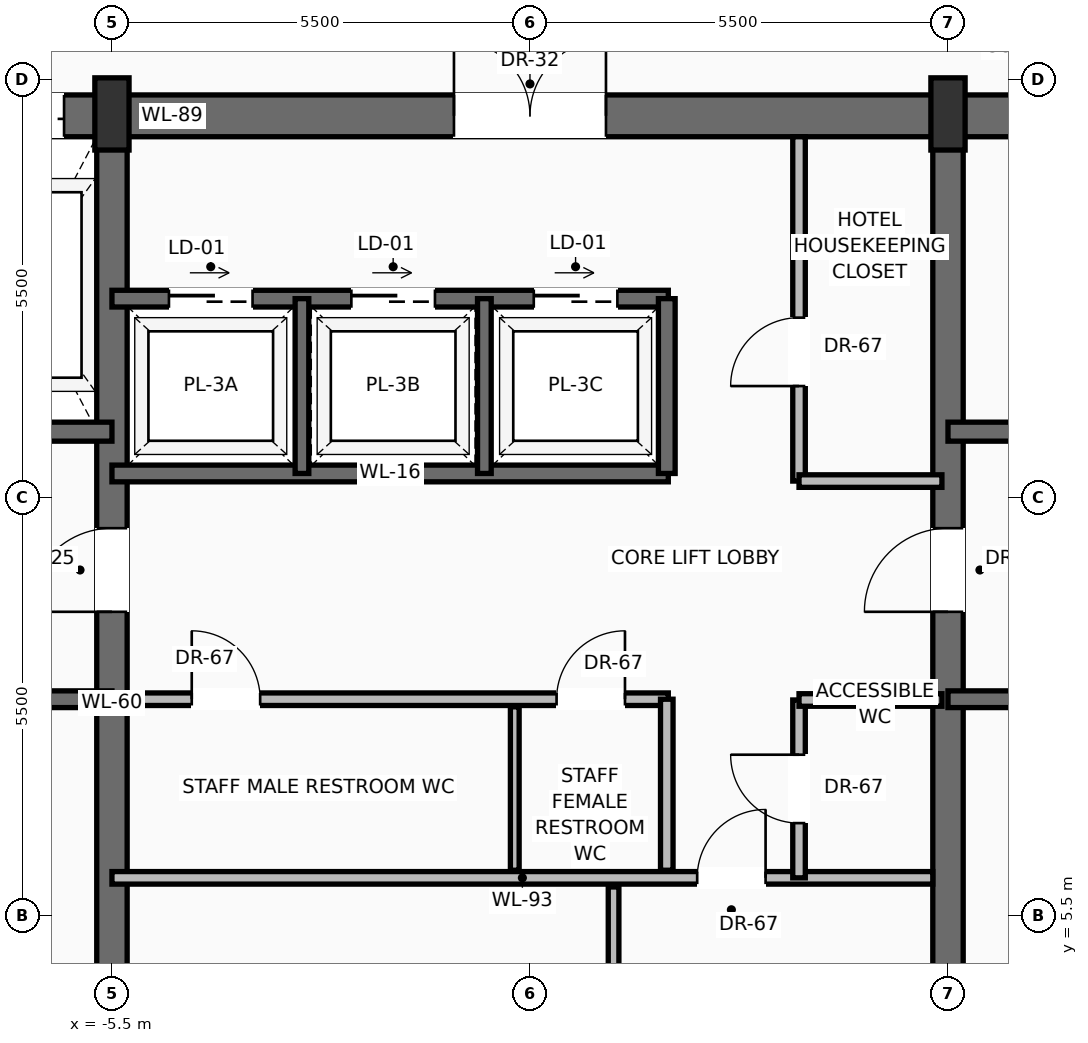
"""IFC4 building model, lengths in metres.
Left out: names, types, materials, properties, quantities, classifications, styles, units other than length and angle.
Written with IfcOpenShell. Run it as: python <this file> out.ifc"""

import sys

from ifc_helpers import new_model, si_unit, direction, frame, frame_2d, origin, origin_2d, place, context, subcontext, project, spatial, rectangle, extrude, source, transform, mapped, element, fill, save


model = new_model("IFC4")
c1 = context("Model", 3, precision=1e-05, world=origin(), true_north=direction((0.0, 1.0)))
c2 = subcontext(c1, "Body", "Model", "MODEL_VIEW")
j1 = project(units=[si_unit("LENGTHUNIT", "METRE"), si_unit("PLANEANGLEUNIT", "RADIAN")], contexts=[c1])
p1 = place(None, origin())
s1 = spatial("IfcSite", under=j1, at=p1, CompositionType="ELEMENT")
p2 = place(p1, origin())
s2 = spatial("IfcBuilding", under=s1, at=p2, CompositionType="ELEMENT")
p3 = place(p2, frame((0.0, 0.0, 237.25)))
s3 = spatial("IfcBuildingStorey", under=s2, at=p3, CompositionType="ELEMENT", Elevation=237.25)
p4 = place(p3, frame((-10.7, 16.025, 0.0), z_axis=(0.0, 0.0, 1.0), x_axis=(1.0, 0.0, 0.0)))
e1 = element("IfcWall", 1, at=p4, inside=s3, PredefinedType="SHEAR", context=c2, shape_type="SweptSolid", body=[
    extrude(rectangle(XDim=21.4, YDim=0.55, at=frame_2d((10.7, 0.0))), origin(), (0.0, 0.0, 1.0), 3.24),
])
p5 = place(p4, frame((3.27, 0.0, 0.0)))
e2 = element("IfcOpeningElement", 2, at=p5, cuts=e1, PredefinedType="OPENING", context=c2, shape_type="SweptSolid", body=[
    extrude(rectangle(XDim=1.3, YDim=2.3, at=frame_2d((0.65, 1.15))), frame((0.0, 0.285, 0.0), z_axis=(0.0, -1.0, 0.0), x_axis=(1.0, 0.0, 0.0)), (0.0, 0.0, 1.0), 0.57),
])
p6 = place(p4, frame((9.7, 0.0, 0.0)))
e3 = element("IfcOpeningElement", 3, at=p6, cuts=e1, PredefinedType="OPENING", context=c2, shape_type="SweptSolid", body=[
    extrude(rectangle(XDim=2.0, YDim=2.4, at=frame_2d((1.0, 1.2))), frame((0.0, 0.285, 0.0), z_axis=(0.0, -1.0, 0.0), x_axis=(1.0, 0.0, 0.0)), (0.0, 0.0, 1.0), 0.57),
])
p7 = place(p3, frame((-5.5, 0.575, 0.0), z_axis=(0.0, 0.0, 1.0), x_axis=(0.0, 1.0, 0.0)))
e4 = element("IfcWall", 4, at=p7, inside=s3, PredefinedType="SHEAR", context=c2, shape_type="SweptSolid", body=[
    extrude(rectangle(XDim=15.45, YDim=0.4, at=frame_2d((7.725, 0.0))), origin(), (0.0, 0.0, 1.0), 3.24),
])
p8 = place(p7, frame((8.925, 0.0, 0.0)))
e5 = element("IfcOpeningElement", 5, at=p8, cuts=e4, PredefinedType="OPENING", context=c2, shape_type="SweptSolid", body=[
    extrude(rectangle(XDim=1.1, YDim=2.2, at=frame_2d((0.55, 1.1))), frame((0.0, 0.21, 0.0), z_axis=(0.0, -1.0, 0.0), x_axis=(1.0, 0.0, 0.0)), (0.0, 0.0, 1.0), 0.42),
])
p9 = place(p3, frame((5.5, 0.575, 0.0), z_axis=(0.0, 0.0, 1.0), x_axis=(0.0, 1.0, 0.0)))
e6 = element("IfcWall", 6, at=p9, inside=s3, PredefinedType="SHEAR", context=c2, shape_type="SweptSolid", body=[
    extrude(rectangle(XDim=15.45, YDim=0.4, at=frame_2d((7.725, 0.0))), origin(), (0.0, 0.0, 1.0), 3.24),
])
p10 = place(p9, frame((8.925, 0.0, 0.0)))
e7 = element("IfcOpeningElement", 7, at=p10, cuts=e6, PredefinedType="OPENING", context=c2, shape_type="SweptSolid", body=[
    extrude(rectangle(XDim=1.1, YDim=2.2, at=frame_2d((0.55, 1.1))), frame((0.0, 0.21, 0.0), z_axis=(0.0, -1.0, 0.0), x_axis=(1.0, 0.0, 0.0)), (0.0, 0.0, 1.0), 0.42),
])
m1 = source(origin(), c2, "Body", "SweptSolid", [
    extrude(rectangle(XDim=0.45, YDim=0.95, at=origin_2d()), origin(), (0.0, 0.0, 1.0), 3.45),
])
for number, where, z_axis, x_axis in (
    (8, (-5.5, 16.05, 0.0), (0.0, 0.0, 1.0), (1.0, 0.0, 0.0)),
    (9, (5.5, 16.05, 0.0), (0.0, 0.0, 1.0), (1.0, 0.0, 0.0)),
):
    element("IfcColumn", number, at=place(p3, frame(where, z_axis=z_axis, x_axis=x_axis)), inside=s3, PredefinedType="PILASTER", context=c2, shape_type="MappedRepresentation", body=[
        mapped(m1, transform((0.0, 0.0, 0.0), scale=1.0)),
    ])
p11 = place(p3, frame((-5.5, 8.35, 0.0), z_axis=(0.0, 0.0, 1.0), x_axis=(-1.0, 0.0, 0.0)))
e10 = element("IfcWall", 10, at=p11, inside=s3, PredefinedType="SOLIDWALL", context=c2, shape_type="SweptSolid", body=[
    extrude(rectangle(XDim=4.65, YDim=0.22, at=frame_2d((2.325, 0.0))), origin(), (0.0, 0.0, 1.0), 3.24),
])
p12 = place(p11, frame((2.5, 0.0, 0.0)))
e11 = element("IfcOpeningElement", 11, at=p12, cuts=e10, PredefinedType="OPENING", context=c2, shape_type="SweptSolid", body=[
    extrude(rectangle(XDim=1.15, YDim=2.2, at=frame_2d((0.575, 1.1))), frame((0.0, 0.12, 0.0), z_axis=(0.0, -1.0, 0.0), x_axis=(1.0, 0.0, 0.0)), (0.0, 0.0, 1.0), 0.24),
])
p13 = place(p3, frame((-5.5, 11.87, 0.0), z_axis=(0.0, 0.0, 1.0), x_axis=(-1.0, 0.0, 0.0)))
e12 = element("IfcWall", 12, at=p13, inside=s3, PredefinedType="SOLIDWALL", context=c2, shape_type="SweptSolid", body=[
    extrude(rectangle(XDim=4.65, YDim=0.25, at=frame_2d((2.325, 0.0))), origin(), (0.0, 0.0, 1.0), 3.24),
])
p14 = place(p13, frame((2.95, 0.0, 0.0)))
e13 = element("IfcOpeningElement", 13, at=p14, cuts=e12, PredefinedType="OPENING", context=c2, shape_type="SweptSolid", body=[
    extrude(rectangle(XDim=1.2, YDim=2.25, at=frame_2d((0.6, 1.125))), frame((0.0, 0.135, 0.0), z_axis=(0.0, -1.0, 0.0), x_axis=(1.0, 0.0, 0.0)), (0.0, 0.0, 1.0), 0.27),
])
p15 = place(p3, frame((10.15, 8.35, 0.0), z_axis=(0.0, 0.0, 1.0), x_axis=(-1.0, 0.0, 0.0)))
e14 = element("IfcWall", 14, at=p15, inside=s3, PredefinedType="SOLIDWALL", context=c2, shape_type="SweptSolid", body=[
    extrude(rectangle(XDim=4.65, YDim=0.22, at=frame_2d((2.325, 0.0))), origin(), (0.0, 0.0, 1.0), 3.24),
])
p16 = place(p15, frame((1.0, 0.0, 0.0)))
e15 = element("IfcOpeningElement", 15, at=p16, cuts=e14, PredefinedType="OPENING", context=c2, shape_type="SweptSolid", body=[
    extrude(rectangle(XDim=1.15, YDim=2.2, at=frame_2d((0.575, 1.1))), frame((0.0, 0.12, 0.0), z_axis=(0.0, -1.0, 0.0), x_axis=(1.0, 0.0, 0.0)), (0.0, 0.0, 1.0), 0.24),
])
p17 = place(p3, frame((10.15, 11.87, 0.0), z_axis=(0.0, 0.0, 1.0), x_axis=(-1.0, 0.0, 0.0)))
e16 = element("IfcWall", 16, at=p17, inside=s3, PredefinedType="SOLIDWALL", context=c2, shape_type="SweptSolid", body=[
    extrude(rectangle(XDim=4.65, YDim=0.25, at=frame_2d((2.325, 0.0))), origin(), (0.0, 0.0, 1.0), 3.24),
])
p18 = place(p17, frame((0.5, 0.0, 0.0)))
e17 = element("IfcOpeningElement", 17, at=p18, cuts=e16, PredefinedType="OPENING", context=c2, shape_type="SweptSolid", body=[
    extrude(rectangle(XDim=1.2, YDim=2.25, at=frame_2d((0.6, 1.125))), frame((0.0, 0.135, 0.0), z_axis=(0.0, -1.0, 0.0), x_axis=(1.0, 0.0, 0.0)), (0.0, 0.0, 1.0), 0.27),
])
p19 = place(p3, frame((-5.5, 6.0, 0.0), z_axis=(0.0, 0.0, 1.0), x_axis=(1.0, 0.0, 0.0)))
e18 = element("IfcWall", 18, at=p19, inside=s3, PredefinedType="PARTITIONING", context=c2, shape_type="SweptSolid", body=[
    extrude(rectangle(XDim=10.8, YDim=0.165, at=frame_2d((5.4, 0.0))), origin(), (0.0, 0.0, 1.0), 3.232),
])
p20 = place(p19, frame((7.7, 0.0, 0.0)))
e19 = element("IfcOpeningElement", 19, at=p20, cuts=e18, PredefinedType="OPENING", context=c2, shape_type="SweptSolid", body=[
    extrude(rectangle(XDim=0.9, YDim=2.1, at=frame_2d((0.45, 1.05))), frame((0.0, 0.093, 0.0), z_axis=(0.0, -1.0, 0.0), x_axis=(1.0, 0.0, 0.0)), (0.0, 0.0, 1.0), 0.185),
])
p21 = place(p3, frame((1.1, 0.85, 0.0), z_axis=(0.0, 0.0, 1.0), x_axis=(0.0, 1.0, 0.0)))
e20 = element("IfcWall", 20, at=p21, inside=s3, PredefinedType="PARTITIONING", context=c2, shape_type="SweptSolid", body=[
    extrude(rectangle(XDim=5.03, YDim=0.14, at=frame_2d((2.515, 0.0))), origin(), (0.0, 0.0, 1.0), 3.232),
])
p22 = place(p21, frame((2.1, 0.0, 0.0)))
e21 = element("IfcOpeningElement", 21, at=p22, cuts=e20, PredefinedType="OPENING", context=c2, shape_type="SweptSolid", body=[
    extrude(rectangle(XDim=0.9, YDim=2.1, at=frame_2d((0.45, 1.05))), frame((0.0, 0.08, 0.0), z_axis=(0.0, -1.0, 0.0), x_axis=(1.0, 0.0, 0.0)), (0.0, 0.0, 1.0), 0.16),
])
p23 = place(p3, frame((3.54, 6.0, 0.0), z_axis=(0.0, 0.0, 1.0), x_axis=(0.0, 1.0, 0.0)))
e22 = element("IfcWall", 22, at=p23, inside=s3, PredefinedType="PARTITIONING", context=c2, shape_type="SweptSolid", body=[
    extrude(rectangle(XDim=2.34, YDim=0.165, at=frame_2d((1.17, 0.0))), origin(), (0.0, 0.0, 1.0), 3.232),
])
p24 = place(p23, frame((0.72, 0.0, 0.0)))
e23 = element("IfcOpeningElement", 23, at=p24, cuts=e22, PredefinedType="OPENING", context=c2, shape_type="SweptSolid", body=[
    extrude(rectangle(XDim=0.9, YDim=2.1, at=frame_2d((0.45, 1.05))), frame((0.0, 0.093, 0.0), z_axis=(0.0, -1.0, 0.0), x_axis=(1.0, 0.0, 0.0)), (0.0, 0.0, 1.0), 0.185),
])
p25 = place(p3, frame((3.54, 8.34, 0.0), z_axis=(0.0, 0.0, 1.0), x_axis=(1.0, 0.0, 0.0)))
e24 = element("IfcWall", 24, at=p25, inside=s3, PredefinedType="PARTITIONING", context=c2, shape_type="SweptSolid", body=[
    extrude(rectangle(XDim=1.88, YDim=0.165, at=frame_2d((0.94, 0.0))), origin(), (0.0, 0.0, 1.0), 3.232),
])
p26 = place(p3, frame((-5.3, 8.35, 0.0), z_axis=(0.0, 0.0, 1.0), x_axis=(1.0, 0.0, 0.0)))
e25 = element("IfcWall", 25, at=p26, inside=s3, PredefinedType="PARTITIONING", context=c2, shape_type="SweptSolid", body=[
    extrude(rectangle(XDim=7.12, YDim=0.165, at=frame_2d((3.56, 0.0))), origin(), (0.0, 0.0, 1.0), 3.232),
])
p27 = place(p26, frame((0.85, 0.0, 0.0)))
e26 = element("IfcOpeningElement", 26, at=p27, cuts=e25, PredefinedType="OPENING", context=c2, shape_type="SweptSolid", body=[
    extrude(rectangle(XDim=0.9, YDim=2.1, at=frame_2d((0.45, 1.05))), frame((0.0, 0.093, 0.0), z_axis=(0.0, -1.0, 0.0), x_axis=(1.0, 0.0, 0.0)), (0.0, 0.0, 1.0), 0.185),
])
p28 = place(p26, frame((5.65, 0.0, 0.0)))
e27 = element("IfcOpeningElement", 27, at=p28, cuts=e25, PredefinedType="OPENING", context=c2, shape_type="SweptSolid", body=[
    extrude(rectangle(XDim=0.9, YDim=2.1, at=frame_2d((0.45, 1.05))), frame((0.0, 0.093, 0.0), z_axis=(0.0, -1.0, 0.0), x_axis=(1.0, 0.0, 0.0)), (0.0, 0.0, 1.0), 0.185),
])
p29 = place(p3, frame((1.8, 6.1, 0.0), z_axis=(0.0, 0.0, 1.0), x_axis=(0.0, 1.0, 0.0)))
e28 = element("IfcWall", 28, at=p29, inside=s3, PredefinedType="PARTITIONING", context=c2, shape_type="SweptSolid", body=[
    extrude(rectangle(XDim=2.25, YDim=0.165, at=frame_2d((1.125, 0.0))), origin(), (0.0, 0.0, 1.0), 3.232),
])
p30 = place(p3, frame((-0.2, 6.1, 0.0), z_axis=(0.0, 0.0, 1.0), x_axis=(0.0, 1.0, 0.0)))
e29 = element("IfcWall", 29, at=p30, inside=s3, PredefinedType="PARTITIONING", context=c2, shape_type="SweptSolid", body=[
    extrude(rectangle(XDim=2.15, YDim=0.115, at=frame_2d((1.075, 0.0))), origin(), (0.0, 0.0, 1.0), 3.232),
])
p31 = place(p3, frame((-5.5, 11.32, 0.0), z_axis=(0.0, 0.0, 1.0), x_axis=(1.0, 0.0, 0.0)))
e30 = element("IfcWall", 30, at=p31, inside=s3, PredefinedType="SOLIDWALL", context=c2, shape_type="SweptSolid", body=[
    extrude(rectangle(XDim=7.32, YDim=0.22, at=frame_2d((3.66, 0.0))), origin(), (0.0, 0.0, 1.0), 3.24),
])
p32 = place(p3, frame((-5.5, 13.62, 0.0), z_axis=(0.0, 0.0, 1.0), x_axis=(1.0, 0.0, 0.0)))
e31 = element("IfcWall", 31, at=p32, inside=s3, PredefinedType="SOLIDWALL", context=c2, shape_type="SweptSolid", body=[
    extrude(rectangle(XDim=7.32, YDim=0.22, at=frame_2d((3.66, 0.0))), origin(), (0.0, 0.0, 1.0), 3.24),
])
p33 = place(p32, frame((0.75, 0.0, 0.0)))
e32 = element("IfcOpeningElement", 32, at=p33, cuts=e31, PredefinedType="OPENING", context=c2, shape_type="SweptSolid", body=[
    extrude(rectangle(XDim=1.1, YDim=2.2, at=frame_2d((0.55, 1.1))), frame((0.0, 0.12, 0.0), z_axis=(0.0, -1.0, 0.0), x_axis=(1.0, 0.0, 0.0)), (0.0, 0.0, 1.0), 0.24),
])
p34 = place(p32, frame((3.15, 0.0, 0.0)))
e33 = element("IfcOpeningElement", 33, at=p34, cuts=e31, PredefinedType="OPENING", context=c2, shape_type="SweptSolid", body=[
    extrude(rectangle(XDim=1.1, YDim=2.2, at=frame_2d((0.55, 1.1))), frame((0.0, 0.12, 0.0), z_axis=(0.0, -1.0, 0.0), x_axis=(1.0, 0.0, 0.0)), (0.0, 0.0, 1.0), 0.24),
])
p35 = place(p32, frame((5.55, 0.0, 0.0)))
e34 = element("IfcOpeningElement", 34, at=p35, cuts=e31, PredefinedType="OPENING", context=c2, shape_type="SweptSolid", body=[
    extrude(rectangle(XDim=1.1, YDim=2.2, at=frame_2d((0.55, 1.1))), frame((0.0, 0.12, 0.0), z_axis=(0.0, -1.0, 0.0), x_axis=(1.0, 0.0, 0.0)), (0.0, 0.0, 1.0), 0.24),
])
p36 = place(p3, frame((1.8, 11.32, 0.0), z_axis=(0.0, 0.0, 1.0), x_axis=(0.0, 1.0, 0.0)))
e35 = element("IfcWall", 35, at=p36, inside=s3, PredefinedType="SOLIDWALL", context=c2, shape_type="SweptSolid", body=[
    extrude(rectangle(XDim=2.3, YDim=0.22, at=frame_2d((1.15, 0.0))), origin(), (0.0, 0.0, 1.0), 3.24),
])
for number, where, z_axis, x_axis in (
    (36, (-3.0, 11.32, 0.0), (0.0, 0.0, 1.0), (0.0, 1.0, 0.0)),
    (37, (-0.6, 11.32, 0.0), (0.0, 0.0, 1.0), (0.0, 1.0, 0.0)),
):
    element("IfcWall", number, at=place(p3, frame(where, z_axis=z_axis, x_axis=x_axis)), inside=s3, PredefinedType="SOLIDWALL", context=c2, shape_type="SweptSolid", body=[
        extrude(rectangle(XDim=2.3, YDim=0.18, at=frame_2d((1.15, 0.0))), origin(), (0.0, 0.0, 1.0), 3.24),
    ])
p37 = place(p3, frame((3.54, 11.22, 0.0), z_axis=(0.0, 0.0, 1.0), x_axis=(0.0, 1.0, 0.0)))
e38 = element("IfcWall", 38, at=p37, inside=s3, PredefinedType="PARTITIONING", context=c2, shape_type="SweptSolid", body=[
    extrude(rectangle(XDim=4.53, YDim=0.165, at=frame_2d((2.265, 0.0))), origin(), (0.0, 0.0, 1.0), 3.232),
])
p38 = place(p37, frame((1.25, 0.0, 0.0)))
e39 = element("IfcOpeningElement", 39, at=p38, cuts=e38, PredefinedType="OPENING", context=c2, shape_type="SweptSolid", body=[
    extrude(rectangle(XDim=0.9, YDim=2.1, at=frame_2d((0.45, 1.05))), frame((0.0, 0.093, 0.0), z_axis=(0.0, -1.0, 0.0), x_axis=(1.0, 0.0, 0.0)), (0.0, 0.0, 1.0), 0.185),
])
p39 = place(p3, frame((3.54, 11.22, 0.0), z_axis=(0.0, 0.0, 1.0), x_axis=(1.0, 0.0, 0.0)))
e40 = element("IfcWall", 40, at=p39, inside=s3, PredefinedType="PARTITIONING", context=c2, shape_type="SweptSolid", body=[
    extrude(rectangle(XDim=1.88, YDim=0.165, at=frame_2d((0.94, 0.0))), origin(), (0.0, 0.0, 1.0), 3.232),
])
m2 = source(origin(), c2, "Body", "SweptSolid", [
    extrude(rectangle(XDim=1.1, YDim=2.2, at=frame_2d((0.55, 1.1))), frame((0.0, 0.025, 0.0), z_axis=(0.0, -1.0, 0.0), x_axis=(1.0, 0.0, 0.0)), (0.0, 0.0, 1.0), 0.05),
])
p40 = place(p8, origin())
e41 = element("IfcDoor", 41, at=p40, inside=s3, OperationType="SINGLE_SWING_LEFT", PredefinedType="DOOR", context=c2, shape_type="MappedRepresentation", body=[
    mapped(m2, transform((0.0, 0.0, 0.0), scale=1.0)),
])
fill(e5, e41)
m3 = source(origin(), c2, "Body", "SweptSolid", [
    extrude(rectangle(XDim=1.3, YDim=2.3, at=frame_2d((0.65, 1.15))), frame((0.0, 0.025, 0.0), z_axis=(0.0, -1.0, 0.0), x_axis=(1.0, 0.0, 0.0)), (0.0, 0.0, 1.0), 0.05),
])
p41 = place(p5, origin())
e42 = element("IfcDoor", 42, at=p41, inside=s3, OperationType="SLIDING_TO_RIGHT", PredefinedType="DOOR", context=c2, shape_type="MappedRepresentation", body=[
    mapped(m3, transform((0.0, 0.0, 0.0), scale=1.0)),
])
fill(e2, e42)
p42 = place(p10, origin())
e43 = element("IfcDoor", 43, at=p42, inside=s3, OperationType="SINGLE_SWING_LEFT", PredefinedType="DOOR", context=c2, shape_type="MappedRepresentation", body=[
    mapped(m2, transform((0.0, 0.0, 0.0), scale=1.0)),
])
fill(e7, e43)
m4 = source(origin(), c2, "Body", "SweptSolid", [
    extrude(rectangle(XDim=2.0, YDim=2.4, at=frame_2d((1.0, 1.2))), frame((0.0, 0.025, 0.0), z_axis=(0.0, -1.0, 0.0), x_axis=(1.0, 0.0, 0.0)), (0.0, 0.0, 1.0), 0.05),
])
p43 = place(p6, origin())
e44 = element("IfcDoor", 44, at=p43, inside=s3, OperationType="DOUBLE_DOOR_SINGLE_SWING", PredefinedType="DOOR", context=c2, shape_type="MappedRepresentation", body=[
    mapped(m4, transform((0.0, 0.0, 0.0), scale=1.0)),
])
fill(e3, e44)
m5 = source(origin(), c2, "Body", "SweptSolid", [
    extrude(rectangle(XDim=0.9, YDim=2.1, at=frame_2d((0.45, 1.05))), frame((0.0, 0.025, 0.0), z_axis=(0.0, -1.0, 0.0), x_axis=(1.0, 0.0, 0.0)), (0.0, 0.0, 1.0), 0.05),
])
p44 = place(p20, origin())
e45 = element("IfcDoor", 45, at=p44, inside=s3, OperationType="SINGLE_SWING_RIGHT", PredefinedType="DOOR", context=c2, shape_type="MappedRepresentation", body=[
    mapped(m5, transform((0.0, 0.0, 0.0), scale=1.0)),
])
fill(e19, e45)
p45 = place(p24, origin())
e46 = element("IfcDoor", 46, at=p45, inside=s3, OperationType="SINGLE_SWING_RIGHT", PredefinedType="DOOR", context=c2, shape_type="MappedRepresentation", body=[
    mapped(m5, transform((0.0, 0.0, 0.0), scale=1.0)),
])
fill(e23, e46)
p46 = place(p27, origin())
e47 = element("IfcDoor", 47, at=p46, inside=s3, OperationType="SINGLE_SWING_LEFT", PredefinedType="DOOR", context=c2, shape_type="MappedRepresentation", body=[
    mapped(m5, transform((0.0, 0.0, 0.0), scale=1.0)),
])
fill(e26, e47)
p47 = place(p28, origin())
e48 = element("IfcDoor", 48, at=p47, inside=s3, OperationType="SINGLE_SWING_RIGHT", PredefinedType="DOOR", context=c2, shape_type="MappedRepresentation", body=[
    mapped(m5, transform((0.0, 0.0, 0.0), scale=1.0)),
])
fill(e27, e48)
m6 = source(origin(), c2, "Body", "SweptSolid", [
    extrude(rectangle(XDim=1.1, YDim=2.2, at=frame_2d((0.55, 1.1))), frame((0.0, 0.025, 0.0), z_axis=(0.0, -1.0, 0.0), x_axis=(1.0, 0.0, 0.0)), (0.0, 0.0, 1.0), 0.05),
])
p48 = place(p33, origin())
e49 = element("IfcDoor", 49, at=p48, inside=s3, OperationType="SLIDING_TO_RIGHT", PredefinedType="DOOR", context=c2, shape_type="MappedRepresentation", body=[
    mapped(m6, transform((0.0, 0.0, 0.0), scale=1.0)),
])
fill(e32, e49)
p49 = place(p34, origin())
e50 = element("IfcDoor", 50, at=p49, inside=s3, OperationType="SLIDING_TO_RIGHT", PredefinedType="DOOR", context=c2, shape_type="MappedRepresentation", body=[
    mapped(m6, transform((0.0, 0.0, 0.0), scale=1.0)),
])
fill(e33, e50)
p50 = place(p35, origin())
e51 = element("IfcDoor", 51, at=p50, inside=s3, OperationType="SLIDING_TO_RIGHT", PredefinedType="DOOR", context=c2, shape_type="MappedRepresentation", body=[
    mapped(m6, transform((0.0, 0.0, 0.0), scale=1.0)),
])
fill(e34, e51)
p51 = place(p38, origin())
e52 = element("IfcDoor", 52, at=p51, inside=s3, OperationType="SINGLE_SWING_LEFT", PredefinedType="DOOR", context=c2, shape_type="MappedRepresentation", body=[
    mapped(m5, transform((0.0, 0.0, 0.0), scale=1.0)),
])
fill(e39, e52)
save(model, sys.argv[1])
